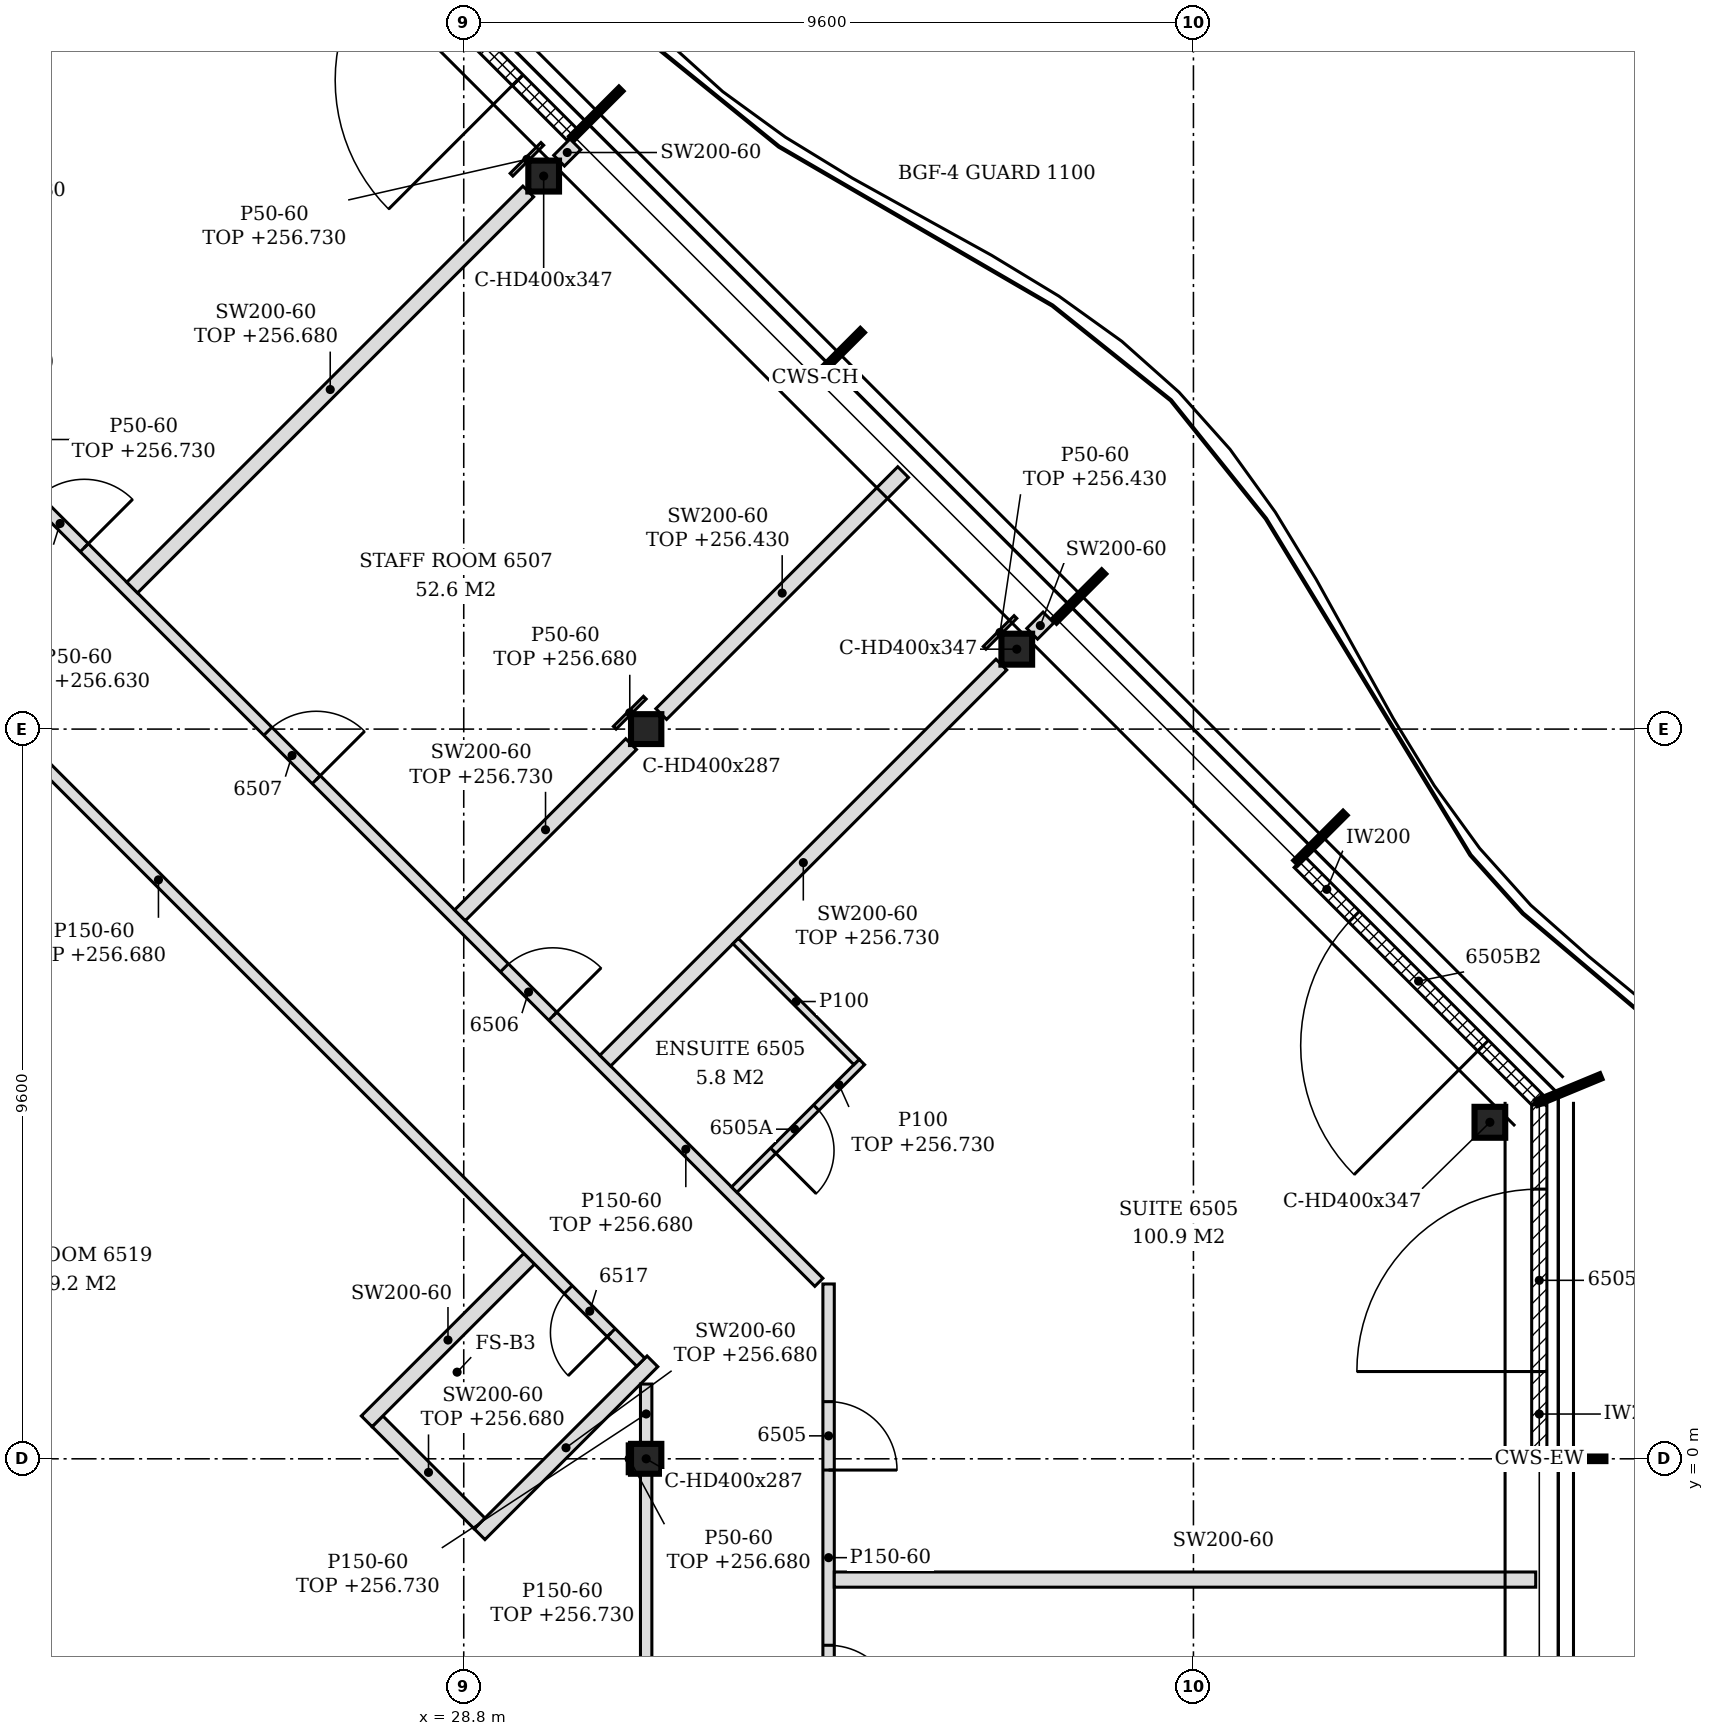
"""IFC4 building model, lengths in metres.
Left out: names, types, materials, properties, quantities, classifications, styles, units other than length and angle.
Written with IfcOpenShell. Run it as: python <this file> out.ifc"""

import sys

from ifc_helpers import new_model, si_unit, direction, frame, frame_2d, origin, origin_2d, place, context, subcontext, project, spatial, polyline, rectangle, i_section, outline, extrude, element, fill, save


model = new_model("IFC4")
c1 = context("Model", 3, precision=1e-05, world=origin(), true_north=direction((0.0, 1.0)))
c2 = subcontext(c1, "Body", "Model", "MODEL_VIEW")
j1 = project(units=[si_unit("LENGTHUNIT", "METRE"), si_unit("PLANEANGLEUNIT", "RADIAN")], contexts=[c1])
p1 = place(None, origin())
s1 = spatial("IfcSite", under=j1, at=p1, CompositionType="ELEMENT")
p2 = place(p1, origin())
s2 = spatial("IfcBuilding", under=s1, at=p2, CompositionType="ELEMENT")
p3 = place(p2, frame((0.0, 0.0, 253.8)))
s3 = spatial("IfcBuildingStorey", under=s2, at=p3, CompositionType="ELEMENT", Elevation=253.8)
for number, where, z_axis, x_axis in (
    (1, (42.3, 4.427, -0.15), (0.0, 0.0, 1.0), (1.0, 0.0, 0.0)),
    (2, (36.076, 10.652, -0.15), (0.0, 0.0, 1.0), (1.0, 0.0, 0.0)),
    (3, (29.852, 16.876, -0.15), (0.0, 0.0, 1.0), (1.0, 0.0, 0.0)),
):
    element("IfcColumn", number, at=place(p3, frame(where, z_axis=z_axis, x_axis=x_axis)), inside=s3, PredefinedType="COLUMN", context=c2, shape_type="SweptSolid", body=[
        extrude(i_section(OverallWidth=0.404, OverallDepth=0.407, WebThickness=0.027, FlangeThickness=0.044, FilletRadius=0.015, at=origin_2d()), origin(), (0.0, 0.0, 1.0), 3.6),
    ])
for number, where, z_axis, x_axis in (
    (4, (31.2, 0.0, -0.15), (0.0, 0.0, 1.0), (1.0, 0.0, 0.0)),
    (5, (31.2, 9.6, -0.15), (0.0, 0.0, 1.0), (1.0, 0.0, 0.0)),
):
    element("IfcColumn", number, at=place(p3, frame(where, z_axis=z_axis, x_axis=x_axis)), inside=s3, PredefinedType="COLUMN", context=c2, shape_type="SweptSolid", body=[
        extrude(i_section(OverallWidth=0.399, OverallDepth=0.393, WebThickness=0.023, FlangeThickness=0.037, FilletRadius=0.015, at=origin_2d()), origin(), (0.0, 0.0, 1.0), 3.6),
    ])
p4 = place(p3, frame((42.95, 0.03, 0.0), z_axis=(0.0, 0.0, 1.0), x_axis=(0.0, 1.0, 0.0)))
e6 = element("IfcWall", 6, at=p4, inside=s3, PredefinedType="NOTDEFINED", context=c2, shape_type="SweptSolid", body=[
    extrude(rectangle(XDim=4.626, YDim=0.2, at=frame_2d((2.313, 0.0))), origin(), (0.0, 0.0, 1.0), 3.45),
])
p5 = place(p4, frame((1.118, 0.0, 0.0)))
e7 = element("IfcOpeningElement", 7, at=p5, cuts=e6, PredefinedType="OPENING", context=c2, shape_type="SweptSolid", body=[
    extrude(rectangle(XDim=2.4, YDim=2.4, at=frame_2d((1.2, 1.2))), frame((0.0, 0.11, 0.0), z_axis=(0.0, -1.0, 0.0), x_axis=(1.0, 0.0, 0.0)), (0.0, 0.0, 1.0), 0.22),
])
p6 = place(p3, frame((42.922, 4.725, 0.0), z_axis=(0.0, 0.0, 1.0), x_axis=(-0.707079168996, 0.707134392299, 0.0)))
e8 = element("IfcWall", 8, at=p6, inside=s3, PredefinedType="NOTDEFINED", context=c2, shape_type="SweptSolid", body=[
    extrude(rectangle(XDim=4.421, YDim=0.2, at=frame_2d((2.21, 0.0))), origin(), (0.0, 0.0, 1.0), 3.45),
])
p7 = place(p6, frame((1.005, 0.0, 0.0)))
e9 = element("IfcOpeningElement", 9, at=p7, cuts=e8, PredefinedType="OPENING", context=c2, shape_type="SweptSolid", body=[
    extrude(rectangle(XDim=2.4, YDim=2.4, at=frame_2d((1.2, 1.2))), frame((0.0, 0.11, 0.0), z_axis=(0.0, -1.0, 0.0), x_axis=(1.0, 0.0, 0.0)), (0.0, 0.0, 1.0), 0.22),
])
p8 = place(p3, frame((30.226, 17.42, 0.0), z_axis=(0.0, 0.0, 1.0), x_axis=(-0.707079231393, 0.707134329907, 0.0)))
e10 = element("IfcWall", 10, at=p8, inside=s3, PredefinedType="NOTDEFINED", context=c2, shape_type="SweptSolid", body=[
    extrude(rectangle(XDim=4.431, YDim=0.2, at=frame_2d((2.215, 0.0))), origin(), (0.0, 0.0, 1.0), 3.45),
])
p9 = place(p8, frame((1.015, 0.0, 0.0)))
e11 = element("IfcOpeningElement", 11, at=p9, cuts=e10, PredefinedType="OPENING", context=c2, shape_type="SweptSolid", body=[
    extrude(rectangle(XDim=2.4, YDim=2.4, at=frame_2d((1.2, 1.2))), frame((0.0, 0.11, 0.0), z_axis=(0.0, -1.0, 0.0), x_axis=(1.0, 0.0, 0.0)), (0.0, 0.0, 1.0), 0.22),
])
p10 = place(p3, frame((33.6, -4.037, 0.0), z_axis=(0.0, 0.0, 1.0), x_axis=(0.0, 1.0, 0.0)))
e12 = element("IfcWall", 12, at=p10, inside=s3, PredefinedType="PARTITIONING", context=c2, shape_type="SweptSolid", body=[
    extrude(outline(polyline([(0.0, 0.0), (6.337, 0.0), (6.337, 3.45), (4.142, 3.45), (4.14, 2.88), (3.932, 2.88), (3.93, 3.45), (0.0, 3.45), (0.0, 0.0)])), frame((0.0, 0.075, 0.0), z_axis=(0.0, -1.0, 0.0), x_axis=(1.0, 0.0, 0.0)), (0.0, 0.0, 1.0), 0.15),
])
p11 = place(p10, frame((0.684, 0.0, 0.0)))
e13 = element("IfcOpeningElement", 13, at=p11, cuts=e12, PredefinedType="OPENING", context=c2, shape_type="SweptSolid", body=[
    extrude(rectangle(XDim=0.9, YDim=2.1, at=frame_2d((0.45, 1.05))), frame((0.0, 0.085, 0.0), z_axis=(0.0, -1.0, 0.0), x_axis=(1.0, 0.0, 0.0)), (0.0, 0.0, 1.0), 0.17),
])
p12 = place(p10, frame((3.889, 0.0, 0.0)))
e14 = element("IfcOpeningElement", 14, at=p12, cuts=e12, PredefinedType="OPENING", context=c2, shape_type="SweptSolid", body=[
    extrude(rectangle(XDim=0.9, YDim=2.1, at=frame_2d((0.45, 1.05))), frame((0.0, 0.085, 0.0), z_axis=(0.0, -1.0, 0.0), x_axis=(1.0, 0.0, 0.0)), (0.0, 0.0, 1.0), 0.17),
])
p13 = place(p3, frame((31.2, -3.043, 0.0), z_axis=(0.0, 0.0, 1.0), x_axis=(0.0, 1.0, 0.0)))
e15 = element("IfcWall", 15, at=p13, inside=s3, PredefinedType="PARTITIONING", context=c2, shape_type="SweptSolid", body=[
    extrude(rectangle(XDim=2.846, YDim=0.15, at=frame_2d((1.423, 0.0))), origin(), (0.0, 0.0, 1.0), 2.93),
])
p14 = place(p3, frame((33.675, -1.589, 0.0), z_axis=(0.0, 0.0, 1.0), x_axis=(1.0, 0.0, 0.0)))
e16 = element("IfcWall", 16, at=p14, inside=s3, PredefinedType="PARTITIONING", context=c2, shape_type="SweptSolid", body=[
    extrude(outline(polyline([(0.0, 0.0), (9.228, 0.0), (9.228, 3.45), (8.775, 3.45), (8.773, 2.93), (8.475, 2.93), (8.473, 3.45), (0.0, 3.45), (0.0, 0.0)])), frame((0.0, 0.1, 0.0), z_axis=(0.0, -1.0, 0.0), x_axis=(1.0, 0.0, 0.0)), (0.0, 0.0, 1.0), 0.2),
])
p15 = place(p3, frame((29.008, -0.992, 0.0), z_axis=(0.0, 0.0, 1.0), x_axis=(0.707106781187, 0.707106781187, 0.0)))
e17 = element("IfcWall", 17, at=p15, inside=s3, PredefinedType="PARTITIONING", context=c2, shape_type="SweptSolid", body=[
    extrude(rectangle(XDim=3.216, YDim=0.2, at=frame_2d((1.608, 0.0))), origin(), (0.0, 0.0, 1.0), 2.88),
])
p16 = place(p3, frame((29.008, -0.85, 0.0), z_axis=(0.0, 0.0, 1.0), x_axis=(-0.707042536715, 0.707171019822, 0.0)))
e18 = element("IfcWall", 18, at=p16, inside=s3, PredefinedType="PARTITIONING", context=c2, shape_type="SweptSolid", body=[
    extrude(rectangle(XDim=1.9, YDim=0.2, at=frame_2d((0.95, 0.0))), origin(), (0.0, 0.0, 1.0), 2.88),
])
p17 = place(p3, frame((31.2, 0.197, 0.0), z_axis=(0.0, 0.0, 1.0), x_axis=(0.0, 1.0, 0.0)))
e19 = element("IfcWall", 19, at=p17, inside=s3, PredefinedType="PARTITIONING", context=c2, shape_type="SweptSolid", body=[
    extrude(rectangle(XDim=0.787, YDim=0.15, at=frame_2d((0.394, 0.0))), origin(), (0.0, 0.0, 1.0), 2.93),
])
p18 = place(p3, frame((27.523, 0.493, 0.0), z_axis=(0.0, 0.0, 1.0), x_axis=(0.707147142314, 0.707066417755, 0.0)))
e20 = element("IfcWall", 20, at=p18, inside=s3, PredefinedType="PARTITIONING", context=c2, shape_type="SweptSolid", body=[
    extrude(rectangle(XDim=3.024, YDim=0.2, at=frame_2d((1.512, 0.0))), origin(), (0.0, 0.0, 1.0), 3.45),
])
p19 = place(p3, frame((31.129, 1.271, 0.0), z_axis=(0.0, 0.0, 1.0), x_axis=(-0.707114135277, 0.70709942702, 0.0)))
e21 = element("IfcWall", 21, at=p19, inside=s3, PredefinedType="PARTITIONING", context=c2, shape_type="SweptSolid", body=[
    extrude(rectangle(XDim=16.599, YDim=0.15, at=frame_2d((8.299, 0.0))), origin(), (0.0, 0.0, 1.0), 2.88),
])
p20 = place(p19, frame((0.55, 0.0, 0.0)))
e22 = element("IfcOpeningElement", 22, at=p20, cuts=e21, PredefinedType="OPENING", context=c2, shape_type="SweptSolid", body=[
    extrude(rectangle(XDim=0.8, YDim=2.1, at=frame_2d((0.4, 1.05))), frame((0.0, 0.085, 0.0), z_axis=(0.0, -1.0, 0.0), x_axis=(1.0, 0.0, 0.0)), (0.0, 0.0, 1.0), 0.17),
])
p21 = place(p3, frame((33.472, 2.322, 0.0), z_axis=(0.0, 0.0, 1.0), x_axis=(-0.707106781187, 0.707106781187, 0.0)))
e23 = element("IfcWall", 23, at=p21, inside=s3, PredefinedType="PARTITIONING", context=c2, shape_type="SweptSolid", body=[
    extrude(rectangle(XDim=15.203, YDim=0.15, at=frame_2d((7.602, 0.0))), origin(), (0.0, 0.0, 1.0), 2.88),
])
p22 = place(p21, frame((4.951, 0.0, 0.0)))
e24 = element("IfcOpeningElement", 24, at=p22, cuts=e23, PredefinedType="OPENING", context=c2, shape_type="SweptSolid", body=[
    extrude(rectangle(XDim=0.9, YDim=2.1, at=frame_2d((0.45, 1.05))), frame((0.0, 0.085, 0.0), z_axis=(0.0, -1.0, 0.0), x_axis=(1.0, 0.0, 0.0)), (0.0, 0.0, 1.0), 0.17),
])
p23 = place(p21, frame((9.352, 0.0, 0.0)))
e25 = element("IfcOpeningElement", 25, at=p23, cuts=e23, PredefinedType="OPENING", context=c2, shape_type="SweptSolid", body=[
    extrude(rectangle(XDim=0.9, YDim=2.1, at=frame_2d((0.45, 1.05))), frame((0.0, 0.085, 0.0), z_axis=(0.0, -1.0, 0.0), x_axis=(1.0, 0.0, 0.0)), (0.0, 0.0, 1.0), 0.17),
])
p24 = place(p21, frame((13.668, 0.0, 0.0)))
e26 = element("IfcOpeningElement", 26, at=p24, cuts=e23, PredefinedType="OPENING", context=c2, shape_type="SweptSolid", body=[
    extrude(rectangle(XDim=0.9, YDim=2.1, at=frame_2d((0.45, 1.05))), frame((0.0, 0.085, 0.0), z_axis=(0.0, -1.0, 0.0), x_axis=(1.0, 0.0, 0.0)), (0.0, 0.0, 1.0), 0.17),
])
p25 = place(p3, frame((32.359, 3.541, 0.0), z_axis=(0.0, 0.0, 1.0), x_axis=(0.707158179099, 0.707055379538, 0.0)))
e27 = element("IfcWall", 27, at=p25, inside=s3, PredefinedType="PARTITIONING", context=c2, shape_type="SweptSolid", body=[
    extrude(rectangle(XDim=2.375, YDim=0.1, at=frame_2d((1.188, 0.0))), origin(), (0.0, 0.0, 1.0), 2.93),
])
p26 = place(p25, frame((0.725, 0.0, 0.0)))
e28 = element("IfcOpeningElement", 28, at=p26, cuts=e27, PredefinedType="OPENING", context=c2, shape_type="SweptSolid", body=[
    extrude(rectangle(XDim=0.8, YDim=2.1, at=frame_2d((0.4, 1.05))), frame((0.0, 0.06, 0.0), z_axis=(0.0, -1.0, 0.0), x_axis=(1.0, 0.0, 0.0)), (0.0, 0.0, 1.0), 0.12),
])
p27 = place(p3, frame((30.662, 5.238, 0.0), z_axis=(0.0, 0.0, 1.0), x_axis=(0.707106781187, 0.707106781187, 0.0)))
e29 = element("IfcWall", 29, at=p27, inside=s3, PredefinedType="PARTITIONING", context=c2, shape_type="SweptSolid", body=[
    extrude(rectangle(XDim=7.369, YDim=0.2, at=frame_2d((3.685, 0.0))), origin(), (0.0, 0.0, 1.0), 2.93),
])
p28 = place(p3, frame((33.968, 5.22, 0.0), z_axis=(0.0, 0.0, 1.0), x_axis=(-0.707106781187, 0.707106781187, 0.0)))
e30 = element("IfcWall", 30, at=p28, inside=s3, PredefinedType="PARTITIONING", context=c2, shape_type="SweptSolid", body=[
    extrude(rectangle(XDim=2.25, YDim=0.1, at=frame_2d((1.125, 0.0))), origin(), (0.0, 0.0, 1.0), 3.45),
])
p29 = place(p3, frame((28.75, 7.15, 0.0), z_axis=(0.0, 0.0, 1.0), x_axis=(0.7070684525, 0.707145107796, 0.0)))
e31 = element("IfcWall", 31, at=p29, inside=s3, PredefinedType="PARTITIONING", context=c2, shape_type="SweptSolid", body=[
    extrude(rectangle(XDim=3.185, YDim=0.2, at=frame_2d((1.592, 0.0))), origin(), (0.0, 0.0, 1.0), 2.93),
])
p30 = place(p3, frame((31.398, 9.798, 0.0), z_axis=(0.0, 0.0, 1.0), x_axis=(0.707133900936, 0.707079660397, 0.0)))
e32 = element("IfcWall", 32, at=p30, inside=s3, PredefinedType="PARTITIONING", context=c2, shape_type="SweptSolid", body=[
    extrude(rectangle(XDim=4.501, YDim=0.2, at=frame_2d((2.25, 0.0))), origin(), (0.0, 0.0, 1.0), 2.63),
])
p31 = place(p3, frame((36.278, 10.854, 0.0), z_axis=(0.0, 0.0, 1.0), x_axis=(0.707509117806, 0.706704215511, 0.0)))
e33 = element("IfcWall", 33, at=p31, inside=s3, PredefinedType="PARTITIONING", context=c2, shape_type="SweptSolid", body=[
    extrude(rectangle(XDim=0.303, YDim=0.2, at=frame_2d((0.152, 0.0))), origin(), (0.0, 0.0, 1.0), 3.45),
])
p32 = place(p3, frame((24.438, 11.462, 0.0), z_axis=(0.0, 0.0, 1.0), x_axis=(0.707090216072, 0.707123345913, 0.0)))
e34 = element("IfcWall", 34, at=p32, inside=s3, PredefinedType="PARTITIONING", context=c2, shape_type="SweptSolid", body=[
    extrude(rectangle(XDim=7.369, YDim=0.2, at=frame_2d((3.685, 0.0))), origin(), (0.0, 0.0, 1.0), 2.88),
])
p33 = place(p3, frame((30.054, 17.078, 0.0), z_axis=(0.0, 0.0, 1.0), x_axis=(0.707106781187, 0.707106781187, 0.0)))
e35 = element("IfcWall", 35, at=p33, inside=s3, PredefinedType="PARTITIONING", context=c2, shape_type="SweptSolid", body=[
    extrude(rectangle(XDim=0.303, YDim=0.2, at=frame_2d((0.152, 0.0))), origin(), (0.0, 0.0, 1.0), 3.45),
])
p34 = place(p3, frame((30.976, -0.197, 0.0), z_axis=(0.0, 0.0, 1.0), x_axis=(0.0, 1.0, 0.0)))
e36 = element("IfcWall", 36, at=p34, inside=s3, PredefinedType="PARTITIONING", context=c2, shape_type="SweptSolid", body=[
    extrude(rectangle(XDim=0.393, YDim=0.05, at=frame_2d((0.197, 0.0))), origin(), (0.0, 0.0, 1.0), 2.88),
])
p35 = place(p3, frame((35.653, 10.669, 0.0), z_axis=(0.0, 0.0, 1.0), x_axis=(0.707106781187, 0.707106781187, 0.0)))
e37 = element("IfcWall", 37, at=p35, inside=s3, PredefinedType="PARTITIONING", context=c2, shape_type="SweptSolid", body=[
    extrude(rectangle(XDim=0.573, YDim=0.05, at=frame_2d((0.287, 0.0))), origin(), (0.0, 0.0, 1.0), 2.63),
])
p36 = place(p3, frame((30.786, 9.618, 0.0), z_axis=(0.0, 0.0, 1.0), x_axis=(0.707106781187, 0.707106781187, 0.0)))
e38 = element("IfcWall", 38, at=p36, inside=s3, PredefinedType="PARTITIONING", context=c2, shape_type="SweptSolid", body=[
    extrude(rectangle(XDim=0.56, YDim=0.05, at=frame_2d((0.28, 0.0))), origin(), (0.0, 0.0, 1.0), 2.88),
])
p37 = place(p3, frame((29.428, 16.893, 0.0), z_axis=(0.0, 0.0, 1.0), x_axis=(0.707106781187, 0.707106781187, 0.0)))
e39 = element("IfcWall", 39, at=p37, inside=s3, PredefinedType="PARTITIONING", context=c2, shape_type="SweptSolid", body=[
    extrude(rectangle(XDim=0.573, YDim=0.05, at=frame_2d((0.287, 0.0))), origin(), (0.0, 0.0, 1.0), 2.93),
])
p38 = place(p5, origin())
e40 = element("IfcDoor", 40, at=p38, inside=s3, OperationType="SINGLE_SWING_LEFT", PredefinedType="DOOR", context=c2, shape_type="SweptSolid", body=[
    extrude(rectangle(XDim=2.4, YDim=2.4, at=frame_2d((1.2, 1.2))), frame((0.0, 0.025, 0.0), z_axis=(0.0, -1.0, 0.0), x_axis=(1.0, 0.0, 0.0)), (0.0, 0.0, 1.0), 0.05),
])
fill(e7, e40)
p39 = place(p7, origin())
e41 = element("IfcDoor", 41, at=p39, inside=s3, OperationType="SINGLE_SWING_LEFT", PredefinedType="DOOR", context=c2, shape_type="SweptSolid", body=[
    extrude(rectangle(XDim=2.4, YDim=2.4, at=frame_2d((1.2, 1.2))), frame((0.0, 0.025, 0.0), z_axis=(0.0, -1.0, 0.0), x_axis=(1.0, 0.0, 0.0)), (0.0, 0.0, 1.0), 0.05),
])
fill(e9, e41)
p40 = place(p9, origin())
e42 = element("IfcDoor", 42, at=p40, inside=s3, OperationType="SINGLE_SWING_LEFT", PredefinedType="DOOR", context=c2, shape_type="SweptSolid", body=[
    extrude(rectangle(XDim=2.4, YDim=2.4, at=frame_2d((1.2, 1.2))), frame((0.0, 0.025, 0.0), z_axis=(0.0, -1.0, 0.0), x_axis=(1.0, 0.0, 0.0)), (0.0, 0.0, 1.0), 0.05),
])
fill(e11, e42)
p41 = place(p11, frame((0.9, 0.0, 0.0), z_axis=(0.0, 0.0, 1.0), x_axis=(-1.0, 0.0, 0.0)))
e43 = element("IfcDoor", 43, at=p41, inside=s3, OperationType="SINGLE_SWING_RIGHT", PredefinedType="DOOR", context=c2, shape_type="SweptSolid", body=[
    extrude(rectangle(XDim=0.9, YDim=2.1, at=frame_2d((0.45, 1.05))), frame((0.0, 0.025, 0.0), z_axis=(0.0, -1.0, 0.0), x_axis=(1.0, 0.0, 0.0)), (0.0, 0.0, 1.0), 0.05),
])
fill(e13, e43)
p42 = place(p12, frame((0.9, 0.0, 0.0), z_axis=(0.0, 0.0, 1.0), x_axis=(-1.0, 0.0, 0.0)))
e44 = element("IfcDoor", 44, at=p42, inside=s3, OperationType="SINGLE_SWING_RIGHT", PredefinedType="DOOR", context=c2, shape_type="SweptSolid", body=[
    extrude(rectangle(XDim=0.9, YDim=2.1, at=frame_2d((0.45, 1.05))), frame((0.0, 0.025, 0.0), z_axis=(0.0, -1.0, 0.0), x_axis=(1.0, 0.0, 0.0)), (0.0, 0.0, 1.0), 0.05),
])
fill(e14, e44)
p43 = place(p26, frame((0.8, 0.0, 0.0), z_axis=(0.0, 0.0, 1.0), x_axis=(-1.0, 0.0, 0.0)))
e45 = element("IfcDoor", 45, at=p43, inside=s3, OperationType="SINGLE_SWING_RIGHT", PredefinedType="DOOR", context=c2, shape_type="SweptSolid", body=[
    extrude(rectangle(XDim=0.8, YDim=2.1, at=frame_2d((0.4, 1.05))), frame((0.0, 0.025, 0.0), z_axis=(0.0, -1.0, 0.0), x_axis=(1.0, 0.0, 0.0)), (0.0, 0.0, 1.0), 0.05),
])
fill(e28, e45)
p44 = place(p22, frame((0.9, 0.0, 0.0), z_axis=(0.0, 0.0, 1.0), x_axis=(-1.0, 0.0, 0.0)))
e46 = element("IfcDoor", 46, at=p44, inside=s3, OperationType="SINGLE_SWING_RIGHT", PredefinedType="DOOR", context=c2, shape_type="SweptSolid", body=[
    extrude(rectangle(XDim=0.9, YDim=2.1, at=frame_2d((0.45, 1.05))), frame((0.0, 0.025, 0.0), z_axis=(0.0, -1.0, 0.0), x_axis=(1.0, 0.0, 0.0)), (0.0, 0.0, 1.0), 0.05),
])
fill(e24, e46)
p45 = place(p23, frame((0.9, 0.0, 0.0), z_axis=(0.0, 0.0, 1.0), x_axis=(-1.0, 0.0, 0.0)))
e47 = element("IfcDoor", 47, at=p45, inside=s3, OperationType="SINGLE_SWING_RIGHT", PredefinedType="DOOR", context=c2, shape_type="SweptSolid", body=[
    extrude(rectangle(XDim=0.9, YDim=2.1, at=frame_2d((0.45, 1.05))), frame((0.0, 0.025, 0.0), z_axis=(0.0, -1.0, 0.0), x_axis=(1.0, 0.0, 0.0)), (0.0, 0.0, 1.0), 0.05),
])
fill(e25, e47)
p46 = place(p24, frame((0.9, 0.0, 0.0), z_axis=(0.0, 0.0, 1.0), x_axis=(-1.0, 0.0, 0.0)))
e48 = element("IfcDoor", 48, at=p46, inside=s3, OperationType="SINGLE_SWING_RIGHT", PredefinedType="DOOR", context=c2, shape_type="SweptSolid", body=[
    extrude(rectangle(XDim=0.9, YDim=2.1, at=frame_2d((0.45, 1.05))), frame((0.0, 0.025, 0.0), z_axis=(0.0, -1.0, 0.0), x_axis=(1.0, 0.0, 0.0)), (0.0, 0.0, 1.0), 0.05),
])
fill(e26, e48)
p47 = place(p20, origin())
e49 = element("IfcDoor", 49, at=p47, inside=s3, OperationType="SINGLE_SWING_LEFT", PredefinedType="DOOR", context=c2, shape_type="SweptSolid", body=[
    extrude(rectangle(XDim=0.8, YDim=2.1, at=frame_2d((0.4, 1.05))), frame((0.0, 0.025, 0.0), z_axis=(0.0, -1.0, 0.0), x_axis=(1.0, 0.0, 0.0)), (0.0, 0.0, 1.0), 0.05),
])
fill(e22, e49)
save(model, sys.argv[1])
